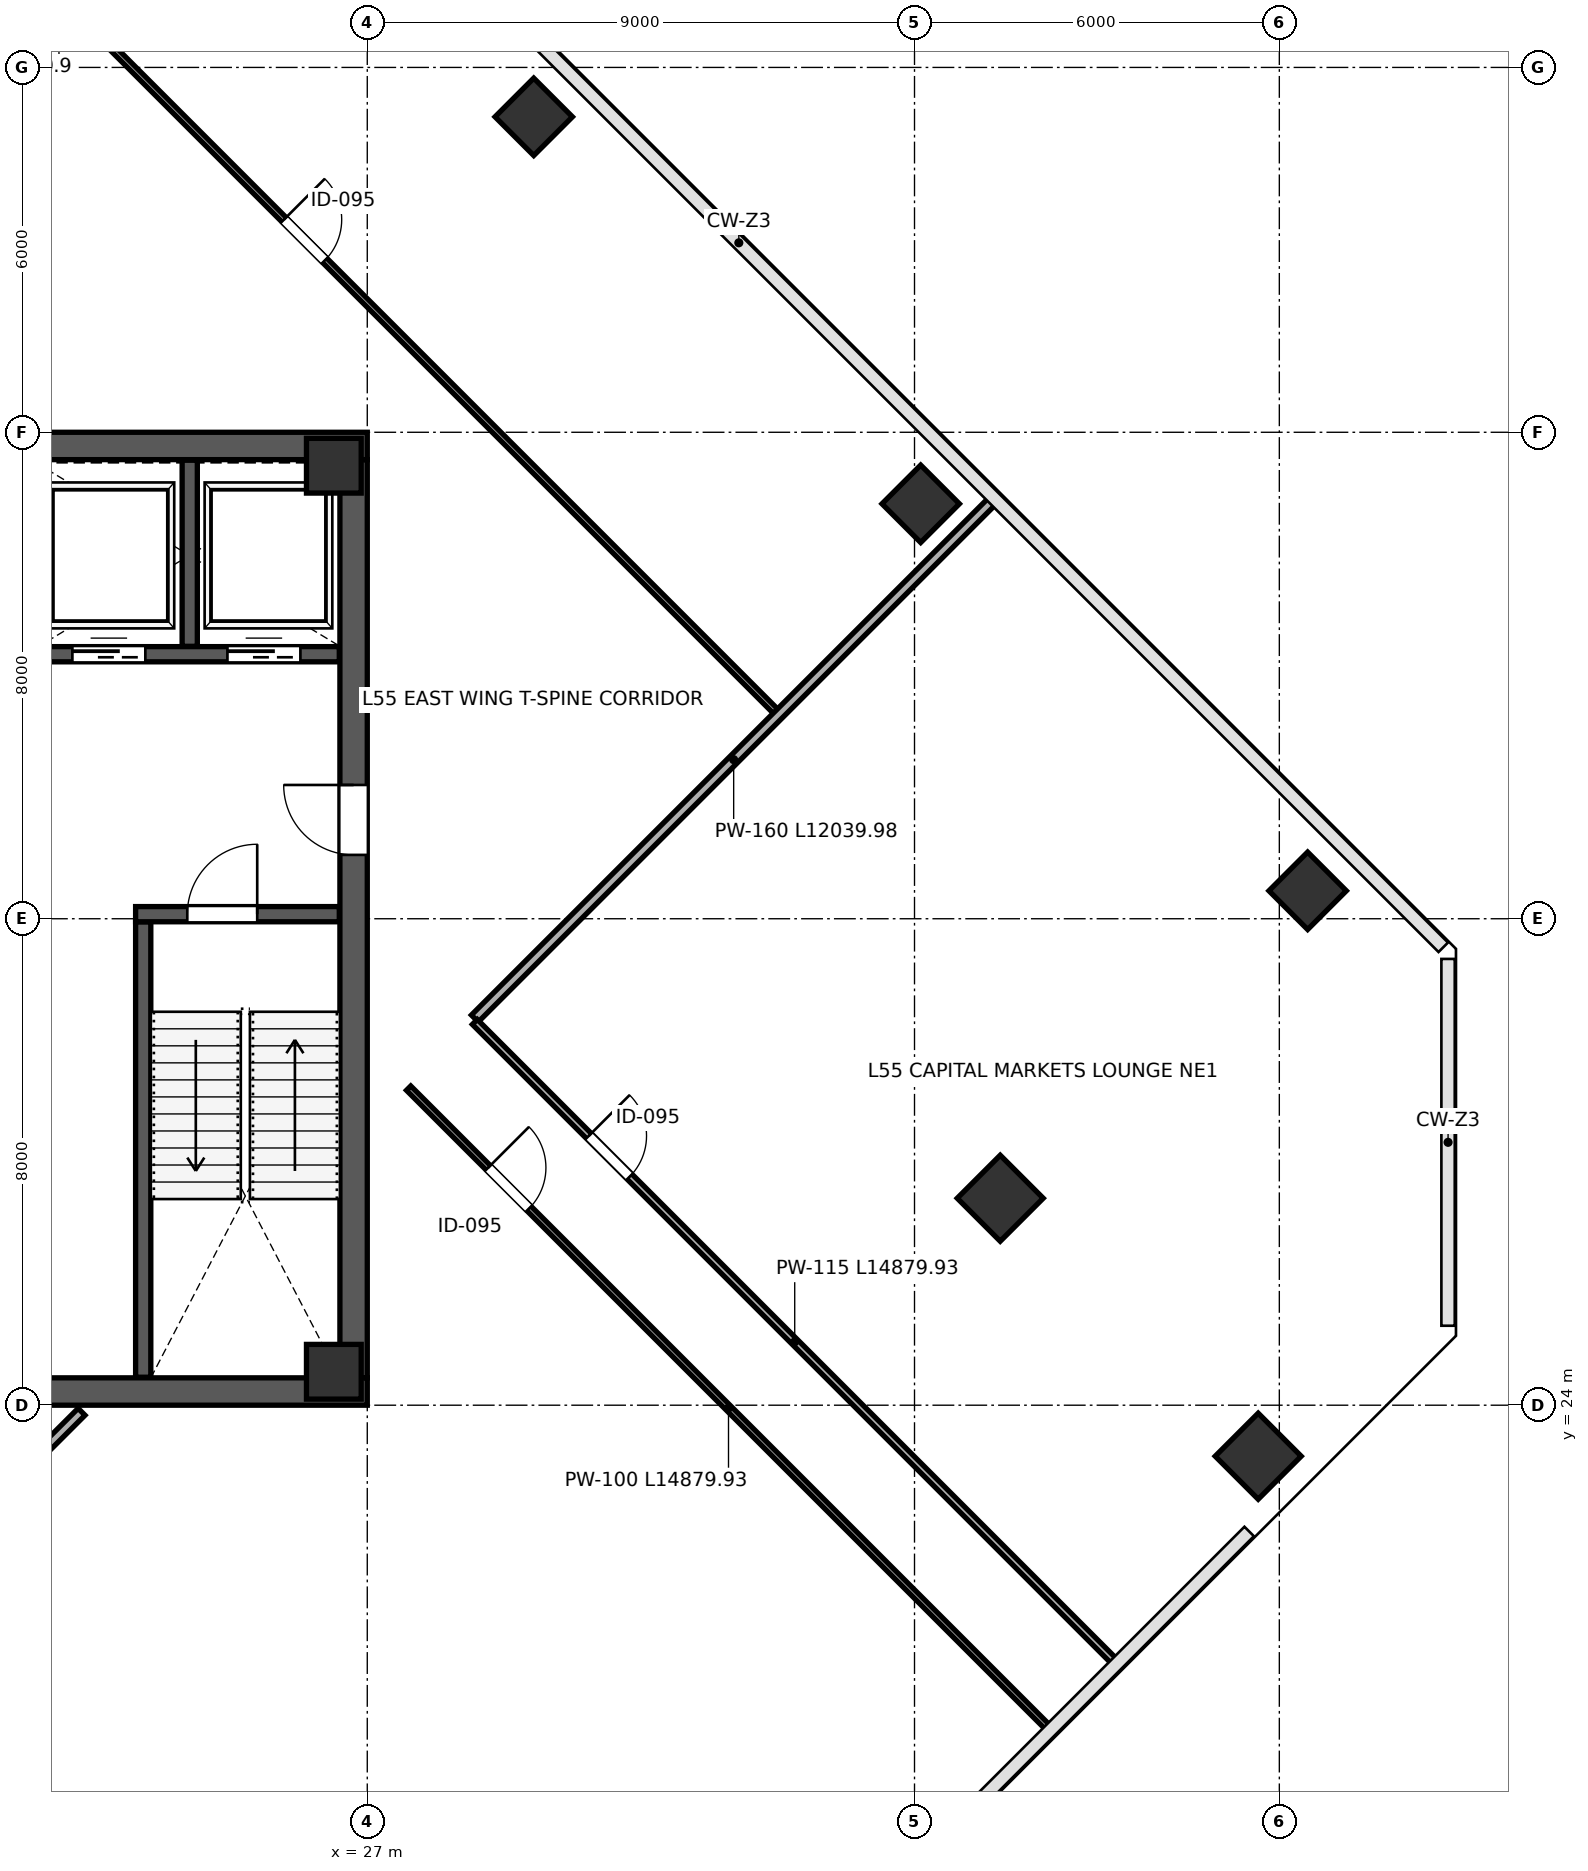
"""IFC4 building model, lengths in metres.
Left out: names, types, materials, properties, quantities, classifications, styles, units other than length and angle.
Written with IfcOpenShell. Run it as: python <this file> out.ifc"""

import sys

from ifc_helpers import new_model, si_unit, direction, frame, frame_2d, origin, origin_2d, place, context, subcontext, project, spatial, rectangle, extrude, source, transform, mapped, element, fill, save


model = new_model("IFC4")
c1 = context("Model", 3, precision=1e-05, world=origin(), true_north=direction((0.0, 1.0)))
c2 = subcontext(c1, "Body", "Model", "MODEL_VIEW")
j1 = project(units=[si_unit("LENGTHUNIT", "METRE"), si_unit("PLANEANGLEUNIT", "RADIAN")], contexts=[c1])
p1 = place(None, origin())
s1 = spatial("IfcSite", under=j1, at=p1, CompositionType="ELEMENT")
p2 = place(p1, origin())
s2 = spatial("IfcBuilding", under=s1, at=p2, CompositionType="ELEMENT")
p3 = place(p2, frame((0.0, 0.0, 245.8)))
s3 = spatial("IfcBuildingStorey", under=s2, at=p3, CompositionType="ELEMENT", Elevation=245.8)
m1 = source(origin(), c2, "Body", "SweptSolid", [
    extrude(rectangle(XDim=0.9, YDim=0.9, at=origin_2d()), origin(), (0.0, 0.0, 1.0), 4.198),
])
for number, where, z_axis, x_axis in (
    (1, (26.45, 24.55, 0.001), (0.0, 0.0, 1.0), (1.0, 0.0, 0.0)),
    (2, (26.45, 39.45, 0.001), (0.0, 0.0, 1.0), (1.0, 0.0, 0.0)),
):
    element("IfcColumn", number, at=place(p3, frame(where, z_axis=z_axis, x_axis=x_axis)), inside=s3, PredefinedType="COLUMN", context=c2, shape_type="MappedRepresentation", body=[
        mapped(m1, transform((0.0, 0.0, 0.0), scale=1.0)),
    ])
m2 = source(origin(), c2, "Body", "SweptSolid", [
    extrude(rectangle(XDim=0.9, YDim=0.9, at=origin_2d()), origin(), (0.0, 0.0, 1.0), 4.198),
])
for number, where, z_axis, x_axis in (
    (3, (29.738, 45.188, 0.001), (0.0, 0.0, 1.0), (-0.707, 0.707, 0.0)),
    (4, (36.102, 38.823, 0.001), (0.0, 0.0, 1.0), (-0.707, 0.707, 0.0)),
):
    element("IfcColumn", number, at=place(p3, frame(where, z_axis=z_axis, x_axis=x_axis)), inside=s3, PredefinedType="COLUMN", context=c2, shape_type="MappedRepresentation", body=[
        mapped(m2, transform((0.0, 0.0, 0.0), scale=1.0)),
    ])
m3 = source(origin(), c2, "Body", "SweptSolid", [
    extrude(rectangle(XDim=1.0, YDim=1.0, at=origin_2d()), origin(), (0.0, 0.0, 1.0), 4.198),
])
p4 = place(p3, frame((37.41, 27.404, 0.001), z_axis=(0.0, 0.0, 1.0), x_axis=(-0.707106781187, 0.707106781187, 0.0)))
e5 = element("IfcColumn", 5, at=p4, inside=s3, PredefinedType="COLUMN", context=c2, shape_type="MappedRepresentation", body=[
    mapped(m3, transform((0.0, 0.0, 0.0), scale=1.0)),
])
p5 = place(p3, frame((42.466, 32.46, 0.001), z_axis=(0.0, 0.0, 1.0), x_axis=(-0.707106781187, 0.707106781187, 0.0)))
e6 = element("IfcColumn", 6, at=p5, inside=s3, PredefinedType="COLUMN", context=c2, shape_type="MappedRepresentation", body=[
    mapped(m2, transform((0.0, 0.0, 0.0), scale=1.0)),
])
m4 = source(origin(), c2, "Body", "SweptSolid", [
    extrude(rectangle(XDim=1.0, YDim=1.0, at=origin_2d()), origin(), (0.0, 0.0, 1.0), 4.198),
])
p6 = place(p3, frame((41.653, 23.161, 0.001), z_axis=(0.0, 0.0, 1.0), x_axis=(-0.707106781187, 0.707106781187, 0.0)))
e7 = element("IfcColumn", 7, at=p6, inside=s3, PredefinedType="COLUMN", context=c2, shape_type="MappedRepresentation", body=[
    mapped(m4, transform((0.0, 0.0, 0.0), scale=1.0)),
])
p7 = place(p3, frame((26.775, 24.45, 0.0), z_axis=(0.0, 0.0, 1.0), x_axis=(0.0, 1.0, 0.0)))
e8 = element("IfcWall", 8, at=p7, inside=s3, PredefinedType="SHEAR", context=c2, shape_type="SweptSolid", body=[
    extrude(rectangle(XDim=15.1, YDim=0.45, at=frame_2d((7.55, 0.0))), origin(), (0.0, 0.0, 1.0), 3.96),
])
p8 = place(p7, frame((8.6, 0.0, 0.0)))
e9 = element("IfcOpeningElement", 9, at=p8, cuts=e8, PredefinedType="OPENING", context=c2, shape_type="SweptSolid", body=[
    extrude(rectangle(XDim=1.15, YDim=2.2, at=frame_2d((0.575, 1.1))), frame((0.0, 0.235, 0.0), z_axis=(0.0, -1.0, 0.0), x_axis=(1.0, 0.0, 0.0)), (0.0, 0.0, 1.0), 0.47),
])
for number, where, z_axis, x_axis in (
    (10, (9.0, 24.225, 0.0), (0.0, 0.0, 1.0), (1.0, 0.0, 0.0)),
    (11, (9.0, 39.775, 0.0), (0.0, 0.0, 1.0), (1.0, 0.0, 0.0)),
):
    element("IfcWall", number, at=place(p3, frame(where, z_axis=z_axis, x_axis=x_axis)), inside=s3, PredefinedType="SHEAR", context=c2, shape_type="SweptSolid", body=[
        extrude(rectangle(XDim=18.0, YDim=0.45, at=frame_2d((9.0, 0.0))), origin(), (0.0, 0.0, 1.0), 3.96),
    ])
p9 = place(p3, frame((23.315, 24.46, 0.0), z_axis=(0.0, 0.0, 1.0), x_axis=(0.0, 1.0, 0.0)))
e12 = element("IfcWall", 12, at=p9, inside=s3, PredefinedType="SHEAR", context=c2, shape_type="SweptSolid", body=[
    extrude(rectangle(XDim=7.49, YDim=0.25, at=frame_2d((3.745, 0.0))), origin(), (0.0, 0.0, 1.0), 3.96),
])
p10 = place(p3, frame((23.19, 32.075, 0.0), z_axis=(0.0, 0.0, 1.0), x_axis=(1.0, 0.0, 0.0)))
e13 = element("IfcWall", 13, at=p10, inside=s3, PredefinedType="SHEAR", context=c2, shape_type="SweptSolid", body=[
    extrude(rectangle(XDim=3.35, YDim=0.25, at=frame_2d((1.675, 0.0))), origin(), (0.0, 0.0, 1.0), 3.96),
])
p11 = place(p10, frame((0.85, 0.0, 0.0)))
e14 = element("IfcOpeningElement", 14, at=p11, cuts=e13, PredefinedType="OPENING", context=c2, shape_type="SweptSolid", body=[
    extrude(rectangle(XDim=1.15, YDim=2.2, at=frame_2d((0.575, 1.1))), frame((0.0, 0.135, 0.0), z_axis=(0.0, -1.0, 0.0), x_axis=(1.0, 0.0, 0.0)), (0.0, 0.0, 1.0), 0.27),
])
p12 = place(p3, frame((21.45, 36.35, 0.0), z_axis=(0.0, 0.0, 1.0), x_axis=(1.0, 0.0, 0.0)))
e15 = element("IfcWall", 15, at=p12, inside=s3, PredefinedType="SHEAR", context=c2, shape_type="SweptSolid", body=[
    extrude(rectangle(XDim=5.09, YDim=0.25, at=frame_2d((2.545, 0.0))), origin(), (0.0, 0.0, 1.0), 3.96),
])
p13 = place(p12, frame((0.7, 0.0, 0.0)))
e16 = element("IfcOpeningElement", 16, at=p13, cuts=e15, PredefinedType="OPENING", context=c2, shape_type="SweptSolid", body=[
    extrude(rectangle(XDim=1.2, YDim=2.2, at=frame_2d((0.6, 1.1))), frame((0.0, 0.135, 0.0), z_axis=(0.0, -1.0, 0.0), x_axis=(1.0, 0.0, 0.0)), (0.0, 0.0, 1.0), 0.27),
])
p14 = place(p12, frame((3.25, 0.0, 0.0)))
e17 = element("IfcOpeningElement", 17, at=p14, cuts=e15, PredefinedType="OPENING", context=c2, shape_type="SweptSolid", body=[
    extrude(rectangle(XDim=1.2, YDim=2.2, at=frame_2d((0.6, 1.1))), frame((0.0, 0.135, 0.0), z_axis=(0.0, -1.0, 0.0), x_axis=(1.0, 0.0, 0.0)), (0.0, 0.0, 1.0), 0.27),
])
p15 = place(p3, frame((24.08, 36.48, 0.0), z_axis=(0.0, 0.0, 1.0), x_axis=(0.0, 1.0, 0.0)))
e18 = element("IfcWall", 18, at=p15, inside=s3, PredefinedType="SHEAR", context=c2, shape_type="SweptSolid", body=[
    extrude(rectangle(XDim=3.06, YDim=0.25, at=frame_2d((1.53, 0.0))), origin(), (0.0, 0.0, 1.0), 3.96),
])
p16 = place(p3, frame((17.993, 51.134, 0.0), z_axis=(0.0, 0.0, 1.0), x_axis=(0.707106781187, -0.707106781187, 0.0)))
e19 = element("IfcWall", 19, at=p16, inside=s3, PredefinedType="PARTITIONING", context=c2, shape_type="SweptSolid", body=[
    extrude(rectangle(XDim=22.27, YDim=0.1, at=frame_2d((11.135, 0.0))), origin(), (0.0, 0.0, 1.0), 3.96),
])
p17 = place(p16, frame((10.8, 0.0, 0.0)))
e20 = element("IfcOpeningElement", 20, at=p17, cuts=e19, PredefinedType="OPENING", context=c2, shape_type="SweptSolid", body=[
    extrude(rectangle(XDim=0.95, YDim=2.15, at=frame_2d((0.475, 1.075))), frame((0.0, 0.06, 0.0), z_axis=(0.0, -1.0, 0.0), x_axis=(1.0, 0.0, 0.0)), (0.0, 0.0, 1.0), 0.12),
])
p18 = place(p3, frame((28.769, 30.36, 0.0), z_axis=(0.0, 0.0, 1.0), x_axis=(0.707116919863, 0.707096642365, 0.0)))
e21 = element("IfcWall", 21, at=p18, inside=s3, PredefinedType="PARTITIONING", context=c2, shape_type="SweptSolid", body=[
    extrude(rectangle(XDim=12.04, YDim=0.16, at=frame_2d((6.02, 0.0))), origin(), (0.0, 0.0, 1.0), 3.195),
])
p19 = place(p3, frame((13.213, 14.803, 0.0), z_axis=(0.0, 0.0, 1.0), x_axis=(0.707116278481, 0.707097283765, 0.0)))
e22 = element("IfcWall", 22, at=p19, inside=s3, PredefinedType="PARTITIONING", context=c2, shape_type="SweptSolid", body=[
    extrude(rectangle(XDim=12.853, YDim=0.16, at=frame_2d((6.427, 0.0))), origin(), (0.0, 0.0, 1.0), 3.96),
])
p20 = place(p3, frame((28.769, 30.303, 0.0), z_axis=(0.0, 0.0, 1.0), x_axis=(0.707106781187, -0.707106781187, 0.0)))
e23 = element("IfcWall", 23, at=p20, inside=s3, PredefinedType="PARTITIONING", context=c2, shape_type="SweptSolid", body=[
    extrude(rectangle(XDim=14.88, YDim=0.115, at=frame_2d((7.44, 0.0))), origin(), (0.0, 0.0, 1.0), 3.96),
])
p21 = place(p20, frame((2.65, 0.0, 0.0)))
e24 = element("IfcOpeningElement", 24, at=p21, cuts=e23, PredefinedType="OPENING", context=c2, shape_type="SweptSolid", body=[
    extrude(rectangle(XDim=0.95, YDim=2.15, at=frame_2d((0.475, 1.075))), frame((0.0, 0.067, 0.0), z_axis=(0.0, -1.0, 0.0), x_axis=(1.0, 0.0, 0.0)), (0.0, 0.0, 1.0), 0.135),
])
p22 = place(p3, frame((27.68, 29.214, 0.0), z_axis=(0.0, 0.0, 1.0), x_axis=(0.707106781187, -0.707106781187, 0.0)))
e25 = element("IfcWall", 25, at=p22, inside=s3, PredefinedType="PARTITIONING", context=c2, shape_type="SweptSolid", body=[
    extrude(rectangle(XDim=14.88, YDim=0.1, at=frame_2d((7.44, 0.0))), origin(), (0.0, 0.0, 1.0), 3.96),
])
p23 = place(p22, frame((1.85, 0.0, 0.0)))
e26 = element("IfcOpeningElement", 26, at=p23, cuts=e25, PredefinedType="OPENING", context=c2, shape_type="SweptSolid", body=[
    extrude(rectangle(XDim=0.95, YDim=2.15, at=frame_2d((0.475, 1.075))), frame((0.0, 0.06, 0.0), z_axis=(0.0, -1.0, 0.0), x_axis=(1.0, 0.0, 0.0)), (0.0, 0.0, 1.0), 0.12),
])
m5 = source(origin(), c2, "Body", "SweptSolid", [
    extrude(rectangle(XDim=1.15, YDim=2.2, at=frame_2d((0.575, 1.1))), frame((0.0, 0.025, 0.0), z_axis=(0.0, -1.0, 0.0), x_axis=(1.0, 0.0, 0.0)), (0.0, 0.0, 1.0), 0.05),
])
p24 = place(p11, origin())
e27 = element("IfcDoor", 27, at=p24, inside=s3, OperationType="SINGLE_SWING_RIGHT", PredefinedType="DOOR", context=c2, shape_type="MappedRepresentation", body=[
    mapped(m5, transform((0.0, 0.0, 0.0), scale=1.0)),
])
fill(e14, e27)
m6 = source(origin(), c2, "Body", "SweptSolid", [
    extrude(rectangle(XDim=1.15, YDim=2.2, at=frame_2d((0.575, 1.1))), frame((0.0, 0.025, 0.0), z_axis=(0.0, -1.0, 0.0), x_axis=(1.0, 0.0, 0.0)), (0.0, 0.0, 1.0), 0.05),
])
p25 = place(p8, origin())
e28 = element("IfcDoor", 28, at=p25, inside=s3, OperationType="SINGLE_SWING_RIGHT", PredefinedType="DOOR", context=c2, shape_type="MappedRepresentation", body=[
    mapped(m6, transform((0.0, 0.0, 0.0), scale=1.0)),
])
fill(e9, e28)
m7 = source(origin(), c2, "Body", "SweptSolid", [
    extrude(rectangle(XDim=1.2, YDim=2.2, at=frame_2d((0.6, 1.1))), frame((0.0, 0.025, 0.0), z_axis=(0.0, -1.0, 0.0), x_axis=(1.0, 0.0, 0.0)), (0.0, 0.0, 1.0), 0.05),
])
p26 = place(p13, origin())
e29 = element("IfcDoor", 29, at=p26, inside=s3, OperationType="SLIDING_TO_LEFT", PredefinedType="DOOR", context=c2, shape_type="MappedRepresentation", body=[
    mapped(m7, transform((0.0, 0.0, 0.0), scale=1.0)),
])
fill(e16, e29)
p27 = place(p14, origin())
e30 = element("IfcDoor", 30, at=p27, inside=s3, OperationType="SLIDING_TO_RIGHT", PredefinedType="DOOR", context=c2, shape_type="MappedRepresentation", body=[
    mapped(m7, transform((0.0, 0.0, 0.0), scale=1.0)),
])
fill(e17, e30)
m8 = source(origin(), c2, "Body", "SweptSolid", [
    extrude(rectangle(XDim=0.95, YDim=2.15, at=frame_2d((0.475, 1.075))), frame((0.0, 0.025, 0.0), z_axis=(0.0, -1.0, 0.0), x_axis=(1.0, 0.0, 0.0)), (0.0, 0.0, 1.0), 0.05),
])
p28 = place(p17, origin())
e31 = element("IfcDoor", 31, at=p28, inside=s3, OperationType="SINGLE_SWING_LEFT", PredefinedType="DOOR", context=c2, shape_type="MappedRepresentation", body=[
    mapped(m8, transform((0.0, 0.0, 0.0), scale=1.0)),
])
fill(e20, e31)
p29 = place(p21, origin())
e32 = element("IfcDoor", 32, at=p29, inside=s3, OperationType="SINGLE_SWING_LEFT", PredefinedType="DOOR", context=c2, shape_type="MappedRepresentation", body=[
    mapped(m8, transform((0.0, 0.0, 0.0), scale=1.0)),
])
fill(e24, e32)
p30 = place(p23, origin())
e33 = element("IfcDoor", 33, at=p30, inside=s3, OperationType="SINGLE_SWING_LEFT", PredefinedType="DOOR", context=c2, shape_type="MappedRepresentation", body=[
    mapped(m8, transform((0.0, 0.0, 0.0), scale=1.0)),
])
fill(e26, e33)
save(model, sys.argv[1])
